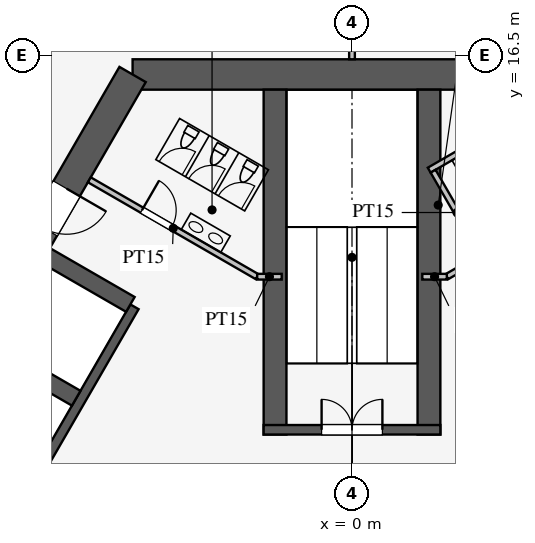
"""IFC4 building model, lengths in metres.
Left out: names, types, materials, properties, quantities, classifications, styles, units other than length and angle.
Written with IfcOpenShell. Run it as: python <this file> out.ifc"""

import sys

from ifc_helpers import new_model, si_unit, direction, frame, frame_2d, origin, place, context, subcontext, project, spatial, rectangle, extrude, element, fill, save


model = new_model("IFC4")
c1 = context("Model", 3, precision=1e-05, world=origin(), true_north=direction((0.0, 1.0)))
c2 = subcontext(c1, "Body", "Model", "MODEL_VIEW")
j1 = project(units=[si_unit("LENGTHUNIT", "METRE"), si_unit("PLANEANGLEUNIT", "RADIAN")], contexts=[c1])
p1 = place(None, origin())
s1 = spatial("IfcSite", under=j1, at=p1, CompositionType="ELEMENT")
p2 = place(p1, origin())
s2 = spatial("IfcBuilding", under=s1, at=p2, CompositionType="ELEMENT")
p3 = place(p2, frame((0.0, 0.0, 157.7)))
s3 = spatial("IfcBuildingStorey", under=s2, at=p3, CompositionType="ELEMENT", Elevation=157.7)
p4 = place(p3, frame((5.773, 16.0, 0.0), z_axis=(0.0, 0.0, 1.0), x_axis=(-1.0, 0.0, 0.0)))
e1 = element("IfcWall", 1, at=p4, inside=s3, PredefinedType="SHEAR", context=c2, shape_type="SweptSolid", body=[
    extrude(rectangle(XDim=11.547, YDim=0.8, at=frame_2d((5.773, 0.0))), origin(), (0.0, 0.0, 1.0), 4.2),
])
p5 = place(p3, frame((-5.773, 16.0, 0.0), z_axis=(0.0, 0.0, 1.0), x_axis=(-0.500002442456, -0.866023993627, 0.0)))
e2 = element("IfcWall", 2, at=p5, inside=s3, PredefinedType="SHEAR", context=c2, shape_type="SweptSolid", body=[
    extrude(rectangle(XDim=21.939, YDim=0.8, at=frame_2d((10.97, 0.0))), origin(), (0.0, 0.0, 1.0), 4.2),
])
p6 = place(p5, frame((17.27, 0.0, 0.0)))
e3 = element("IfcOpeningElement", 3, at=p6, cuts=e2, PredefinedType="OPENING", context=c2, shape_type="SweptSolid", body=[
    extrude(rectangle(XDim=1.2, YDim=2.1, at=frame_2d((0.6, 1.05))), frame((0.0, 0.41, 0.0), z_axis=(0.0, -1.0, 0.0), x_axis=(1.0, 0.0, 0.0)), (0.0, 0.0, 1.0), 0.82),
])
p7 = place(p5, frame((3.47, 0.0, 0.0)))
e4 = element("IfcOpeningElement", 4, at=p7, cuts=e2, PredefinedType="OPENING", context=c2, shape_type="SweptSolid", body=[
    extrude(rectangle(XDim=1.2, YDim=2.1, at=frame_2d((0.6, 1.05))), frame((0.0, 0.41, 0.0), z_axis=(0.0, -1.0, 0.0), x_axis=(1.0, 0.0, 0.0)), (0.0, 0.0, 1.0), 0.82),
])
p8 = place(p3, frame((-5.724, 9.886, 0.0), z_axis=(0.0, 0.0, 1.0), x_axis=(-0.500001763848, -0.866024385424, 0.0)))
e5 = element("IfcWall", 5, at=p8, inside=s3, PredefinedType="SHEAR", context=c2, shape_type="SweptSolid", body=[
    extrude(rectangle(XDim=11.4, YDim=0.25, at=frame_2d((5.7, 0.0))), origin(), (0.0, 0.0, 1.0), 4.2),
])
p9 = place(p8, frame((6.525, 0.0, 0.0)))
e6 = element("IfcOpeningElement", 6, at=p9, cuts=e5, PredefinedType="OPENING", context=c2, shape_type="SweptSolid", body=[
    extrude(rectangle(XDim=1.2, YDim=2.2, at=frame_2d((0.6, 1.1))), frame((0.0, 0.135, 0.0), z_axis=(0.0, -1.0, 0.0), x_axis=(1.0, 0.0, 0.0)), (0.0, 0.0, 1.0), 0.27),
])
p10 = place(p8, frame((9.375, 0.0, 0.0)))
e7 = element("IfcOpeningElement", 7, at=p10, cuts=e5, PredefinedType="OPENING", context=c2, shape_type="SweptSolid", body=[
    extrude(rectangle(XDim=1.2, YDim=2.2, at=frame_2d((0.6, 1.1))), frame((0.0, 0.135, 0.0), z_axis=(0.0, -1.0, 0.0), x_axis=(1.0, 0.0, 0.0)), (0.0, 0.0, 1.0), 0.27),
])
p11 = place(p3, frame((-5.832, 9.949, 0.0), z_axis=(0.0, 0.0, 1.0), x_axis=(-0.866029291668, 0.499993265928, 0.0)))
e8 = element("IfcWall", 8, at=p11, inside=s3, PredefinedType="SHEAR", context=c2, shape_type="SweptSolid", body=[
    extrude(rectangle(XDim=2.575, YDim=0.45, at=frame_2d((1.288, 0.0))), origin(), (0.0, 0.0, 1.0), 4.2),
])
p12 = place(p3, frame((-7.257, 7.481, 0.0), z_axis=(0.0, 0.0, 1.0), x_axis=(-0.866046643894, 0.499963209246, 0.0)))
e9 = element("IfcWall", 9, at=p12, inside=s3, PredefinedType="SHEAR", context=c2, shape_type="SweptSolid", body=[
    extrude(rectangle(XDim=2.575, YDim=0.45, at=frame_2d((1.288, 0.0))), origin(), (0.0, 0.0, 1.0), 4.2),
])
for number, where, z_axis, x_axis in (
    (10, (2.025, 6.525, 0.0), (0.0, 0.0, 1.0), (0.0, 1.0, 0.0)),
    (11, (-2.025, 6.525, 0.0), (0.0, 0.0, 1.0), (0.0, 1.0, 0.0)),
):
    element("IfcWall", number, at=place(p3, frame(where, z_axis=z_axis, x_axis=x_axis)), inside=s3, PredefinedType="SHEAR", context=c2, shape_type="SweptSolid", body=[
        extrude(rectangle(XDim=9.075, YDim=0.6, at=frame_2d((4.538, 0.0))), origin(), (0.0, 0.0, 1.0), 4.2),
    ])
p13 = place(p3, frame((2.325, 6.65, 0.0), z_axis=(0.0, 0.0, 1.0), x_axis=(-1.0, 0.0, 0.0)))
e12 = element("IfcWall", 12, at=p13, inside=s3, PredefinedType="SHEAR", context=c2, shape_type="SweptSolid", body=[
    extrude(rectangle(XDim=4.65, YDim=0.25, at=frame_2d((2.325, 0.0))), origin(), (0.0, 0.0, 1.0), 4.2),
])
p14 = place(p13, frame((1.525, 0.0, 0.0)))
e13 = element("IfcOpeningElement", 13, at=p14, cuts=e12, PredefinedType="OPENING", context=c2, shape_type="SweptSolid", body=[
    extrude(rectangle(XDim=1.6, YDim=2.1, at=frame_2d((0.8, 1.05))), frame((0.0, 0.135, 0.0), z_axis=(0.0, -1.0, 0.0), x_axis=(1.0, 0.0, 0.0)), (0.0, 0.0, 1.0), 0.27),
])
p15 = place(p3, frame((2.495, 10.678, 0.0), z_axis=(0.0, 0.0, 1.0), x_axis=(0.86602216432, 0.500005610874, 0.0)))
e14 = element("IfcWall", 14, at=p15, inside=s3, PredefinedType="PARTITIONING", context=c2, shape_type="SweptSolid", body=[
    extrude(rectangle(XDim=5.1, YDim=0.15, at=frame_2d((2.55, 0.0))), origin(), (0.0, 0.0, 1.0), 4.0),
])
p16 = place(p15, frame((1.3, 0.0, 0.0)))
e15 = element("IfcOpeningElement", 15, at=p16, cuts=e14, PredefinedType="OPENING", context=c2, shape_type="SweptSolid", body=[
    extrude(rectangle(XDim=0.9, YDim=2.1, at=frame_2d((0.45, 1.05))), frame((0.0, 0.085, 0.0), z_axis=(0.0, -1.0, 0.0), x_axis=(1.0, 0.0, 0.0)), (0.0, 0.0, 1.0), 0.17),
])
p17 = place(p3, frame((-2.495, 10.678, 0.0), z_axis=(0.0, 0.0, 1.0), x_axis=(-0.86602216432, 0.500005610874, 0.0)))
e16 = element("IfcWall", 16, at=p17, inside=s3, PredefinedType="PARTITIONING", context=c2, shape_type="SweptSolid", body=[
    extrude(rectangle(XDim=5.1, YDim=0.15, at=frame_2d((2.55, 0.0))), origin(), (0.0, 0.0, 1.0), 4.0),
])
p18 = place(p17, frame((2.6, 0.0, 0.0)))
e17 = element("IfcOpeningElement", 17, at=p18, cuts=e16, PredefinedType="OPENING", context=c2, shape_type="SweptSolid", body=[
    extrude(rectangle(XDim=0.9, YDim=2.1, at=frame_2d((0.45, 1.05))), frame((0.0, 0.085, 0.0), z_axis=(0.0, -1.0, 0.0), x_axis=(1.0, 0.0, 0.0)), (0.0, 0.0, 1.0), 0.17),
])
for number, where, z_axis, x_axis in (
    (18, (2.495, 10.678, 0.0), (0.0, 0.0, 1.0), (-1.0, 0.0, 0.0)),
    (19, (-2.495, 10.678, 0.0), (0.0, 0.0, 1.0), (1.0, 0.0, 0.0)),
):
    element("IfcWall", number, at=place(p3, frame(where, z_axis=z_axis, x_axis=x_axis)), inside=s3, PredefinedType="PARTITIONING", context=c2, shape_type="SweptSolid", body=[
        extrude(rectangle(XDim=0.645, YDim=0.15, at=frame_2d((0.323, 0.0))), origin(), (0.0, 0.0, 1.0), 4.0),
    ])
p19 = place(p3, frame((2.031, 13.482, 0.0), z_axis=(0.0, 0.0, 1.0), x_axis=(0.866050731258, 0.499956128963, 0.0)))
e20 = element("IfcWall", 20, at=p19, inside=s3, PredefinedType="PARTITIONING", context=c2, shape_type="SweptSolid", body=[
    extrude(rectangle(XDim=4.1, YDim=0.15, at=frame_2d((2.05, 0.0))), origin(), (0.0, 0.0, 1.0), 4.0),
])
p20 = place(p3, frame((3.389, 11.281, 0.0), z_axis=(0.0, 0.0, 1.0), x_axis=(-0.499989096993, 0.866031698547, 0.0)))
e21 = element("IfcWall", 21, at=p20, inside=s3, PredefinedType="PARTITIONING", context=c2, shape_type="SweptSolid", body=[
    extrude(rectangle(XDim=2.51, YDim=0.15, at=frame_2d((1.255, 0.0))), origin(), (0.0, 0.0, 1.0), 4.0),
])
p21 = place(p3, frame((0.0, 16.4, 0.0), z_axis=(0.0, 0.0, 1.0), x_axis=(0.0, 1.0, 0.0)))
e22 = element("IfcWall", 22, at=p21, inside=s3, PredefinedType="PARTITIONING", context=c2, shape_type="SweptSolid", body=[
    extrude(rectangle(XDim=16.65, YDim=0.15, at=frame_2d((8.325, 0.0))), origin(), (0.0, 0.0, 1.0), 2.3),
])
p22 = place(p18, frame((0.9, 0.0, 0.0), z_axis=(0.0, 0.0, 1.0), x_axis=(-1.0, 0.0, 0.0)))
e23 = element("IfcDoor", 23, at=p22, inside=s3, OperationType="SINGLE_SWING_LEFT", PredefinedType="DOOR", context=c2, shape_type="SweptSolid", body=[
    extrude(rectangle(XDim=0.9, YDim=2.1, at=frame_2d((0.45, 1.05))), frame((0.0, 0.025, 0.0), z_axis=(0.0, -1.0, 0.0), x_axis=(1.0, 0.0, 0.0)), (0.0, 0.0, 1.0), 0.05),
])
fill(e17, e23)
p23 = place(p14, frame((1.6, 0.0, 0.0), z_axis=(0.0, 0.0, 1.0), x_axis=(-1.0, 0.0, 0.0)))
e24 = element("IfcDoor", 24, at=p23, inside=s3, OperationType="DOUBLE_DOOR_SINGLE_SWING", PredefinedType="DOOR", context=c2, shape_type="SweptSolid", body=[
    extrude(rectangle(XDim=1.6, YDim=2.1, at=frame_2d((0.8, 1.05))), frame((0.0, 0.025, 0.0), z_axis=(0.0, -1.0, 0.0), x_axis=(1.0, 0.0, 0.0)), (0.0, 0.0, 1.0), 0.05),
])
fill(e13, e24)
p24 = place(p7, origin())
e25 = element("IfcDoor", 25, at=p24, inside=s3, OperationType="SINGLE_SWING_LEFT", PredefinedType="DOOR", context=c2, shape_type="SweptSolid", body=[
    extrude(rectangle(XDim=1.2, YDim=2.1, at=frame_2d((0.6, 1.05))), frame((0.0, 0.025, 0.0), z_axis=(0.0, -1.0, 0.0), x_axis=(1.0, 0.0, 0.0)), (0.0, 0.0, 1.0), 0.05),
])
fill(e4, e25)
save(model, sys.argv[1])
